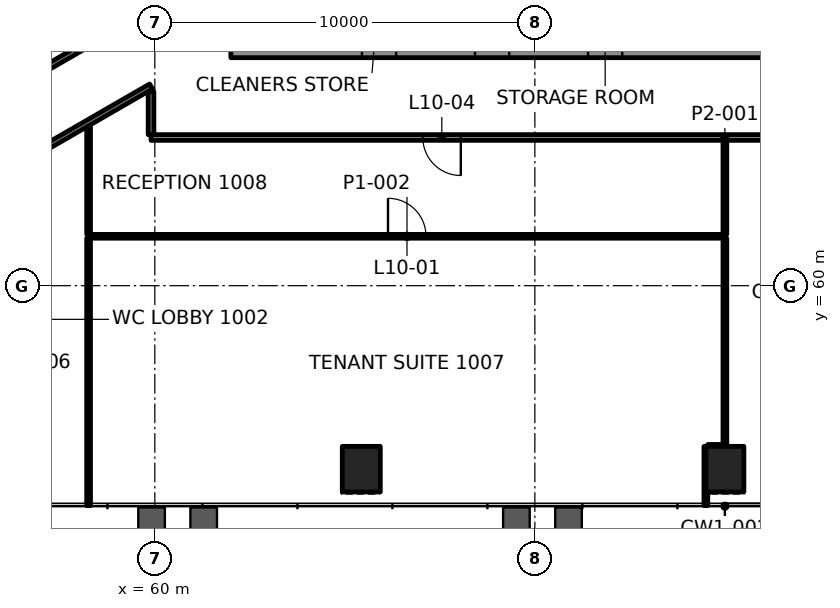
"""IFC4 building model, lengths in metres.
Left out: names, types, materials, properties, quantities, classifications, styles, units other than length and angle.
Written with IfcOpenShell. Run it as: python <this file> out.ifc"""

import sys

from ifc_helpers import new_model, si_unit, direction, frame, frame_2d, origin, origin_2d, place, context, subcontext, project, spatial, rectangle, extrude, element, fill, save


model = new_model("IFC4")
c1 = context("Model", 3, precision=1e-05, world=origin(), true_north=direction((0.0, 1.0)))
c2 = subcontext(c1, "Body", "Model", "MODEL_VIEW")
j1 = project(units=[si_unit("LENGTHUNIT", "METRE"), si_unit("PLANEANGLEUNIT", "RADIAN")], contexts=[c1])
p1 = place(None, origin())
s1 = spatial("IfcSite", under=j1, at=p1, CompositionType="ELEMENT")
p2 = place(p1, origin())
s2 = spatial("IfcBuilding", under=s1, at=p2, CompositionType="ELEMENT")
p3 = place(p2, frame((0.0, 0.0, 48.4)))
s3 = spatial("IfcBuildingStorey", under=s2, at=p3, CompositionType="ELEMENT", Elevation=48.4)
for number, where, z_axis, x_axis in (
    (1, (65.433, 55.172, -0.0), (0.0, 0.0, 1.0), (1.0, 0.0, 0.0)),
    (2, (75.0, 55.172, -0.0), (0.0, 0.0, 1.0), (1.0, 0.0, 0.0)),
):
    element("IfcColumn", number, at=place(p3, frame(where, z_axis=z_axis, x_axis=x_axis)), inside=s3, PredefinedType="COLUMN", context=c2, shape_type="SweptSolid", body=[
        extrude(rectangle(XDim=1.0, YDim=1.2, at=origin_2d()), origin(), (0.0, 0.0, 1.0), 4.2),
    ])
p4 = place(p3, frame((62.0, 66.45, 0.0), z_axis=(0.0, 0.0, 1.0), x_axis=(1.0, 0.0, 0.0)))
e3 = element("IfcWall", 3, at=p4, inside=s3, PredefinedType="SHEAR", context=c2, shape_type="SweptSolid", body=[
    extrude(rectangle(XDim=26.0, YDim=0.9, at=frame_2d((13.0, 0.0))), origin(), (0.0, 0.0, 1.0), 4.0),
])
p5 = place(p4, frame((3.45, 0.0, 0.0)))
e4 = element("IfcOpeningElement", 4, at=p5, cuts=e3, PredefinedType="OPENING", context=c2, shape_type="SweptSolid", body=[
    extrude(rectangle(XDim=0.9, YDim=2.1, at=frame_2d((0.45, 1.05))), frame((0.0, 0.46, 0.0), z_axis=(0.0, -1.0, 0.0), x_axis=(1.0, 0.0, 0.0)), (0.0, 0.0, 1.0), 0.92),
])
p6 = place(p4, frame((6.425, 0.0, 0.0)))
e5 = element("IfcOpeningElement", 5, at=p6, cuts=e3, PredefinedType="OPENING", context=c2, shape_type="SweptSolid", body=[
    extrude(rectangle(XDim=0.9, YDim=2.1, at=frame_2d((0.45, 1.05))), frame((0.0, 0.46, 0.0), z_axis=(0.0, -1.0, 0.0), x_axis=(1.0, 0.0, 0.0)), (0.0, 0.0, 1.0), 0.92),
])
p7 = place(p4, frame((9.4, 0.0, 0.0)))
e6 = element("IfcOpeningElement", 6, at=p7, cuts=e3, PredefinedType="OPENING", context=c2, shape_type="SweptSolid", body=[
    extrude(rectangle(XDim=0.9, YDim=2.1, at=frame_2d((0.45, 1.05))), frame((0.0, 0.46, 0.0), z_axis=(0.0, -1.0, 0.0), x_axis=(1.0, 0.0, 0.0)), (0.0, 0.0, 1.0), 0.92),
])
p8 = place(p4, frame((14.262, 0.0, 0.0)))
e7 = element("IfcOpeningElement", 7, at=p8, cuts=e3, PredefinedType="OPENING", context=c2, shape_type="SweptSolid", body=[
    extrude(rectangle(XDim=0.9, YDim=2.1, at=frame_2d((0.45, 1.05))), frame((0.0, 0.46, 0.0), z_axis=(0.0, -1.0, 0.0), x_axis=(1.0, 0.0, 0.0)), (0.0, 0.0, 1.0), 0.92),
])
p9 = place(p4, frame((21.188, 0.0, 0.0)))
e8 = element("IfcOpeningElement", 8, at=p9, cuts=e3, PredefinedType="OPENING", context=c2, shape_type="SweptSolid", body=[
    extrude(rectangle(XDim=0.9, YDim=2.1, at=frame_2d((0.45, 1.05))), frame((0.0, 0.46, 0.0), z_axis=(0.0, -1.0, 0.0), x_axis=(1.0, 0.0, 0.0)), (0.0, 0.0, 1.0), 0.92),
])
p10 = place(p3, frame((74.551, 55.772, 0.0), z_axis=(0.0, 0.0, 1.0), x_axis=(1.0, 0.0, 0.0)))
e9 = element("IfcWall", 9, at=p10, inside=s3, PredefinedType="PARTITIONING", context=c2, shape_type="SweptSolid", body=[
    extrude(rectangle(XDim=0.399, YDim=0.1, at=frame_2d((0.199, 0.0))), origin(), (0.0, 0.0, 1.0), 3.4),
])
p11 = place(p3, frame((58.271, 61.3, 0.0), z_axis=(0.0, 0.0, 1.0), x_axis=(1.0, 0.0, 0.0)))
e10 = element("IfcWall", 10, at=p11, inside=s3, PredefinedType="PARTITIONING", context=c2, shape_type="SweptSolid", body=[
    extrude(rectangle(XDim=16.729, YDim=0.1, at=frame_2d((8.365, 0.0))), origin(), (0.0, 0.0, 1.0), 3.4),
])
p12 = place(p11, frame((7.865, 0.0, 0.0)))
e11 = element("IfcOpeningElement", 11, at=p12, cuts=e10, PredefinedType="OPENING", context=c2, shape_type="SweptSolid", body=[
    extrude(rectangle(XDim=1.0, YDim=2.1, at=frame_2d((0.5, 1.05))), frame((0.0, 0.06, 0.0), z_axis=(0.0, -1.0, 0.0), x_axis=(1.0, 0.0, 0.0)), (0.0, 0.0, 1.0), 0.12),
])
p13 = place(p3, frame((90.1, 63.9, 0.0), z_axis=(0.0, 0.0, 1.0), x_axis=(-1.0, 0.0, 0.0)))
e12 = element("IfcWall", 12, at=p13, inside=s3, PredefinedType="PARTITIONING", context=c2, shape_type="SweptSolid", body=[
    extrude(rectangle(XDim=30.2, YDim=0.15, at=frame_2d((15.1, 0.0))), origin(), (0.0, 0.0, 1.0), 3.4),
])
p14 = place(p13, frame((3.578, 0.0, 0.0)))
e13 = element("IfcOpeningElement", 13, at=p14, cuts=e12, PredefinedType="OPENING", context=c2, shape_type="SweptSolid", body=[
    extrude(rectangle(XDim=1.0, YDim=2.1, at=frame_2d((0.5, 1.05))), frame((0.0, 0.085, 0.0), z_axis=(0.0, -1.0, 0.0), x_axis=(1.0, 0.0, 0.0)), (0.0, 0.0, 1.0), 0.17),
])
p15 = place(p13, frame((10.926, 0.0, 0.0)))
e14 = element("IfcOpeningElement", 14, at=p15, cuts=e12, PredefinedType="OPENING", context=c2, shape_type="SweptSolid", body=[
    extrude(rectangle(XDim=1.0, YDim=2.1, at=frame_2d((0.5, 1.05))), frame((0.0, 0.085, 0.0), z_axis=(0.0, -1.0, 0.0), x_axis=(1.0, 0.0, 0.0)), (0.0, 0.0, 1.0), 0.17),
])
p16 = place(p13, frame((22.048, 0.0, 0.0)))
e15 = element("IfcOpeningElement", 15, at=p16, cuts=e12, PredefinedType="OPENING", context=c2, shape_type="SweptSolid", body=[
    extrude(rectangle(XDim=1.0, YDim=2.1, at=frame_2d((0.5, 1.05))), frame((0.0, 0.085, 0.0), z_axis=(0.0, -1.0, 0.0), x_axis=(1.0, 0.0, 0.0)), (0.0, 0.0, 1.0), 0.17),
])
p17 = place(p3, frame((59.9, 65.243, 0.0), z_axis=(0.0, 0.0, 1.0), x_axis=(-0.866026378386, -0.499998311937, 0.0)))
e16 = element("IfcWall", 16, at=p17, inside=s3, PredefinedType="PARTITIONING", context=c2, shape_type="SweptSolid", body=[
    extrude(rectangle(XDim=13.764, YDim=0.15, at=frame_2d((6.882, 0.0))), origin(), (0.0, 0.0, 1.0), 3.247),
])
p18 = place(p17, frame((4.209, 0.0, 0.0)))
e17 = element("IfcOpeningElement", 17, at=p18, cuts=e16, PredefinedType="OPENING", context=c2, shape_type="SweptSolid", body=[
    extrude(rectangle(XDim=0.9, YDim=2.1, at=frame_2d((0.45, 1.05))), frame((0.0, 0.085, 0.0), z_axis=(0.0, -1.0, 0.0), x_axis=(1.0, 0.0, 0.0)), (0.0, 0.0, 1.0), 0.17),
])
p19 = place(p17, frame((9.891, 0.0, 0.0)))
e18 = element("IfcOpeningElement", 18, at=p19, cuts=e16, PredefinedType="OPENING", context=c2, shape_type="SweptSolid", body=[
    extrude(rectangle(XDim=1.2, YDim=2.1, at=frame_2d((0.6, 1.05))), frame((0.0, 0.085, 0.0), z_axis=(0.0, -1.0, 0.0), x_axis=(1.0, 0.0, 0.0)), (0.0, 0.0, 1.0), 0.17),
])
p20 = place(p3, frame((47.08, 59.92, 0.0), z_axis=(0.0, 0.0, 1.0), x_axis=(0.866025356753, 0.50000008146, 0.0)))
e19 = element("IfcWall", 19, at=p20, inside=s3, PredefinedType="PARTITIONING", context=c2, shape_type="SweptSolid", body=[
    extrude(rectangle(XDim=14.717, YDim=0.15, at=frame_2d((7.358, 0.0))), origin(), (0.0, 0.0, 1.0), 3.4),
])
p21 = place(p20, frame((6.858, 0.0, 0.0)))
e20 = element("IfcOpeningElement", 20, at=p21, cuts=e19, PredefinedType="OPENING", context=c2, shape_type="SweptSolid", body=[
    extrude(rectangle(XDim=1.0, YDim=2.1, at=frame_2d((0.5, 1.05))), frame((0.0, 0.085, 0.0), z_axis=(0.0, -1.0, 0.0), x_axis=(1.0, 0.0, 0.0)), (0.0, 0.0, 1.0), 0.17),
])
p22 = place(p3, frame((57.3, 68.823, 0.0), z_axis=(0.0, 0.0, 1.0), x_axis=(-0.8660275888, -0.499996215423, 0.0)))
e21 = element("IfcWall", 21, at=p22, inside=s3, PredefinedType="PARTITIONING", context=c2, shape_type="SweptSolid", body=[
    extrude(rectangle(XDim=15.902, YDim=0.1, at=frame_2d((7.951, 0.0))), origin(), (0.0, 0.0, 1.0), 3.4),
])
p23 = place(p22, frame((1.713, 0.0, 0.0)))
e22 = element("IfcOpeningElement", 22, at=p23, cuts=e21, PredefinedType="OPENING", context=c2, shape_type="SweptSolid", body=[
    extrude(rectangle(XDim=0.9, YDim=2.1, at=frame_2d((0.45, 1.05))), frame((0.0, 0.06, 0.0), z_axis=(0.0, -1.0, 0.0), x_axis=(1.0, 0.0, 0.0)), (0.0, 0.0, 1.0), 0.12),
])
p24 = place(p22, frame((7.027, 0.0, 0.0)))
e23 = element("IfcOpeningElement", 23, at=p24, cuts=e21, PredefinedType="OPENING", context=c2, shape_type="SweptSolid", body=[
    extrude(rectangle(XDim=0.9, YDim=2.1, at=frame_2d((0.45, 1.05))), frame((0.0, 0.06, 0.0), z_axis=(0.0, -1.0, 0.0), x_axis=(1.0, 0.0, 0.0)), (0.0, 0.0, 1.0), 0.12),
])
p25 = place(p22, frame((12.816, 0.0, 0.0)))
e24 = element("IfcOpeningElement", 24, at=p25, cuts=e21, PredefinedType="OPENING", context=c2, shape_type="SweptSolid", body=[
    extrude(rectangle(XDim=0.9, YDim=2.1, at=frame_2d((0.45, 1.05))), frame((0.0, 0.06, 0.0), z_axis=(0.0, -1.0, 0.0), x_axis=(1.0, 0.0, 0.0)), (0.0, 0.0, 1.0), 0.12),
])
p26 = place(p3, frame((75.0, 55.773, 0.0), z_axis=(0.0, 0.0, 1.0), x_axis=(0.0, 1.0, 0.0)))
e25 = element("IfcWall", 25, at=p26, inside=s3, PredefinedType="PARTITIONING", context=c2, shape_type="SweptSolid", body=[
    extrude(rectangle(XDim=5.477, YDim=0.1, at=frame_2d((2.739, 0.0))), origin(), (0.0, 0.0, 1.0), 3.4),
])
p27 = place(p3, frame((74.5, 54.212, 0.0), z_axis=(0.0, 0.0, 1.0), x_axis=(0.0, 1.0, 0.0)))
e26 = element("IfcWall", 26, at=p27, inside=s3, PredefinedType="PARTITIONING", context=c2, shape_type="SweptSolid", body=[
    extrude(rectangle(XDim=1.56, YDim=0.1, at=frame_2d((0.78, 0.0))), origin(), (0.0, 0.0, 1.0), 3.165),
])
p28 = place(p3, frame((59.9, 63.975, 0.0), z_axis=(0.0, 0.0, 1.0), x_axis=(0.0, 1.0, 0.0)))
e27 = element("IfcWall", 27, at=p28, inside=s3, PredefinedType="PARTITIONING", context=c2, shape_type="SweptSolid", body=[
    extrude(rectangle(XDim=1.131, YDim=0.15, at=frame_2d((0.565, 0.0))), origin(), (0.0, 0.0, 1.0), 3.247),
])
p29 = place(p3, frame((58.257, 54.212, 0.0), z_axis=(0.0, 0.0, 1.0), x_axis=(0.0, 1.0, 0.0)))
e28 = element("IfcWall", 28, at=p29, inside=s3, PredefinedType="PARTITIONING", context=c2, shape_type="SweptSolid", body=[
    extrude(rectangle(XDim=7.038, YDim=0.1, at=frame_2d((3.519, 0.0))), origin(), (0.0, 0.0, 1.0), 3.165),
])
p30 = place(p3, frame((75.0, 61.35, 0.0), z_axis=(0.0, 0.0, 1.0), x_axis=(0.0, 1.0, 0.0)))
e29 = element("IfcWall", 29, at=p30, inside=s3, PredefinedType="PARTITIONING", context=c2, shape_type="SweptSolid", body=[
    extrude(rectangle(XDim=2.475, YDim=0.1, at=frame_2d((1.237, 0.0))), origin(), (0.0, 0.0, 1.0), 3.4),
])
p31 = place(p3, frame((58.257, 61.35, 0.0), z_axis=(0.0, 0.0, 1.0), x_axis=(0.0, 1.0, 0.0)))
e30 = element("IfcWall", 30, at=p31, inside=s3, PredefinedType="PARTITIONING", context=c2, shape_type="SweptSolid", body=[
    extrude(rectangle(XDim=2.828, YDim=0.1, at=frame_2d((1.414, 0.0))), origin(), (0.0, 0.0, 1.0), 3.247),
])
p32 = place(p12, origin())
e31 = element("IfcDoor", 31, at=p32, inside=s3, OperationType="SINGLE_SWING_RIGHT", PredefinedType="DOOR", context=c2, shape_type="SweptSolid", body=[
    extrude(rectangle(XDim=1.0, YDim=2.1, at=frame_2d((0.5, 1.05))), frame((0.0, 0.025, 0.0), z_axis=(0.0, -1.0, 0.0), x_axis=(1.0, 0.0, 0.0)), (0.0, 0.0, 1.0), 0.05),
])
fill(e11, e31)
p33 = place(p16, origin())
e32 = element("IfcDoor", 32, at=p33, inside=s3, OperationType="SINGLE_SWING_RIGHT", PredefinedType="DOOR", context=c2, shape_type="SweptSolid", body=[
    extrude(rectangle(XDim=1.0, YDim=2.1, at=frame_2d((0.5, 1.05))), frame((0.0, 0.025, 0.0), z_axis=(0.0, -1.0, 0.0), x_axis=(1.0, 0.0, 0.0)), (0.0, 0.0, 1.0), 0.05),
])
fill(e15, e32)
save(model, sys.argv[1])
